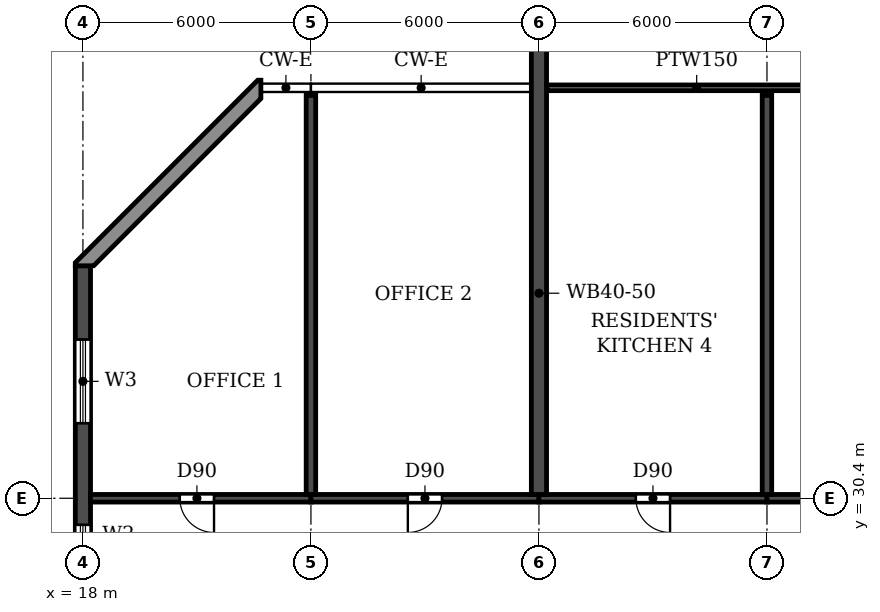
"""IFC4 building model, lengths in metres.
Left out: names, types, materials, properties, quantities, classifications, styles, units other than length and angle.
Written with IfcOpenShell. Run it as: python <this file> out.ifc"""

import sys

from ifc_helpers import new_model, si_unit, direction, frame, frame_2d, origin, place, context, subcontext, project, spatial, polyline, rectangle, outline, extrude, element, fill, save


model = new_model("IFC4")
c1 = context("Model", 3, precision=1e-05, world=origin(), true_north=direction((0.0, 1.0)))
c2 = subcontext(c1, "Body", "Model", "MODEL_VIEW")
j1 = project(units=[si_unit("LENGTHUNIT", "METRE"), si_unit("PLANEANGLEUNIT", "RADIAN")], contexts=[c1])
p1 = place(None, origin())
s1 = spatial("IfcSite", under=j1, at=p1, CompositionType="ELEMENT")
p2 = place(p1, origin())
s2 = spatial("IfcBuilding", under=s1, at=p2, CompositionType="ELEMENT")
p3 = place(p2, frame((0.0, 0.0, 261.0)))
s3 = spatial("IfcBuildingStorey", under=s2, at=p3, CompositionType="ELEMENT", Elevation=261.0)
for number, where, z_axis, x_axis in (
    (1, (24.0, 30.5, 0.0), (0.0, 0.0, 1.0), (0.0, 1.0, 0.0)),
    (2, (36.0, 30.5, 0.0), (0.0, 0.0, 1.0), (0.0, 1.0, 0.0)),
):
    element("IfcWall", number, at=place(p3, frame(where, z_axis=z_axis, x_axis=x_axis)), inside=s3, PredefinedType="SHEAR", context=c2, shape_type="SweptSolid", body=[
        extrude(rectangle(XDim=10.5, YDim=0.25, at=frame_2d((5.25, 0.0))), origin(), (0.0, 0.0, 1.0), 5.7),
    ])
p4 = place(p3, frame((18.0, 4.683, 0.0), z_axis=(0.0, 0.0, 1.0), x_axis=(0.0, 1.0, 0.0)))
e3 = element("IfcWall", 3, at=p4, inside=s3, PredefinedType="SHEAR", context=c2, shape_type="SweptSolid", body=[
    extrude(rectangle(XDim=31.834, YDim=0.4, at=frame_2d((15.917, 0.0))), origin(), (0.0, 0.0, 1.0), 5.7),
])
p5 = place(p4, frame((23.817, 0.0, 0.9)))
e4 = element("IfcOpeningElement", 4, at=p5, cuts=e3, PredefinedType="OPENING", context=c2, shape_type="SweptSolid", body=[
    extrude(rectangle(XDim=1.2, YDim=1.5, at=frame_2d((0.6, 0.75))), frame((0.0, 0.21, 0.0), z_axis=(0.0, -1.0, 0.0), x_axis=(1.0, 0.0, 0.0)), (0.0, 0.0, 1.0), 0.42),
])
p6 = place(p4, frame((8.017, 0.0, 0.9)))
e5 = element("IfcOpeningElement", 5, at=p6, cuts=e3, PredefinedType="OPENING", context=c2, shape_type="SweptSolid", body=[
    extrude(rectangle(XDim=1.2, YDim=1.5, at=frame_2d((0.6, 0.75))), frame((0.0, 0.21, 0.0), z_axis=(0.0, -1.0, 0.0), x_axis=(1.0, 0.0, 0.0)), (0.0, 0.0, 1.0), 0.42),
])
p7 = place(p4, frame((27.694, 0.0, 0.6)))
e6 = element("IfcOpeningElement", 6, at=p7, cuts=e3, PredefinedType="OPENING", context=c2, shape_type="SweptSolid", body=[
    extrude(rectangle(XDim=2.2, YDim=1.8, at=frame_2d((1.1, 0.9))), frame((0.0, 0.21, 0.0), z_axis=(0.0, -1.0, 0.0), x_axis=(1.0, 0.0, 0.0)), (0.0, 0.0, 1.0), 0.42),
])
p8 = place(p4, frame((2.541, 0.0, 0.6)))
e7 = element("IfcOpeningElement", 7, at=p8, cuts=e3, PredefinedType="OPENING", context=c2, shape_type="SweptSolid", body=[
    extrude(rectangle(XDim=2.2, YDim=1.8, at=frame_2d((1.1, 0.9))), frame((0.0, 0.21, 0.0), z_axis=(0.0, -1.0, 0.0), x_axis=(1.0, 0.0, 0.0)), (0.0, 0.0, 1.0), 0.42),
])
p9 = place(p4, frame((15.917, 0.0, 0.9)))
e8 = element("IfcOpeningElement", 8, at=p9, cuts=e3, PredefinedType="OPENING", context=c2, shape_type="SweptSolid", body=[
    extrude(rectangle(XDim=1.2, YDim=1.5, at=frame_2d((0.6, 0.75))), frame((0.0, 0.21, 0.0), z_axis=(0.0, -1.0, 0.0), x_axis=(1.0, 0.0, 0.0)), (0.0, 0.0, 1.0), 0.42),
])
p10 = place(p3, frame((18.2, 30.4, 0.0), z_axis=(0.0, 0.0, 1.0), x_axis=(1.0, 0.0, 0.0)))
e9 = element("IfcWall", 9, at=p10, inside=s3, PredefinedType="SHEAR", context=c2, shape_type="SweptSolid", body=[
    extrude(rectangle(XDim=5.8, YDim=0.2, at=frame_2d((2.9, 0.0))), origin(), (0.0, 0.0, 1.0), 5.1),
])
p11 = place(p10, frame((2.35, 0.0, 0.0)))
e10 = element("IfcOpeningElement", 10, at=p11, cuts=e9, PredefinedType="OPENING", context=c2, shape_type="SweptSolid", body=[
    extrude(rectangle(XDim=0.9, YDim=2.1, at=frame_2d((0.45, 1.05))), frame((0.0, 0.11, 0.0), z_axis=(0.0, -1.0, 0.0), x_axis=(1.0, 0.0, 0.0)), (0.0, 0.0, 1.0), 0.22),
])
p12 = place(p3, frame((24.0, 30.4, 0.0), z_axis=(0.0, 0.0, 1.0), x_axis=(1.0, 0.0, 0.0)))
e11 = element("IfcWall", 11, at=p12, inside=s3, PredefinedType="SHEAR", context=c2, shape_type="SweptSolid", body=[
    extrude(rectangle(XDim=6.0, YDim=0.2, at=frame_2d((3.0, 0.0))), origin(), (0.0, 0.0, 1.0), 5.1),
])
p13 = place(p12, frame((2.55, 0.0, 0.0)))
e12 = element("IfcOpeningElement", 12, at=p13, cuts=e11, PredefinedType="OPENING", context=c2, shape_type="SweptSolid", body=[
    extrude(rectangle(XDim=0.9, YDim=2.1, at=frame_2d((0.45, 1.05))), frame((0.0, 0.11, 0.0), z_axis=(0.0, -1.0, 0.0), x_axis=(1.0, 0.0, 0.0)), (0.0, 0.0, 1.0), 0.22),
])
p14 = place(p3, frame((30.0, 30.4, 0.0), z_axis=(0.0, 0.0, 1.0), x_axis=(1.0, 0.0, 0.0)))
e13 = element("IfcWall", 13, at=p14, inside=s3, PredefinedType="SHEAR", context=c2, shape_type="SweptSolid", body=[
    extrude(rectangle(XDim=6.0, YDim=0.2, at=frame_2d((3.0, 0.0))), origin(), (0.0, 0.0, 1.0), 5.1),
])
p15 = place(p14, frame((2.55, 0.0, 0.0)))
e14 = element("IfcOpeningElement", 14, at=p15, cuts=e13, PredefinedType="OPENING", context=c2, shape_type="SweptSolid", body=[
    extrude(rectangle(XDim=0.9, YDim=2.1, at=frame_2d((0.45, 1.05))), frame((0.0, 0.11, 0.0), z_axis=(0.0, -1.0, 0.0), x_axis=(1.0, 0.0, 0.0)), (0.0, 0.0, 1.0), 0.22),
])
p16 = place(p3, frame((36.0, 30.4, 0.0), z_axis=(0.0, 0.0, 1.0), x_axis=(1.0, 0.0, 0.0)))
e15 = element("IfcWall", 15, at=p16, inside=s3, PredefinedType="SHEAR", context=c2, shape_type="SweptSolid", body=[
    extrude(rectangle(XDim=6.0, YDim=0.2, at=frame_2d((3.0, 0.0))), origin(), (0.0, 0.0, 1.0), 5.1),
])
p17 = place(p16, frame((2.1, 0.0, 0.0)))
e16 = element("IfcOpeningElement", 16, at=p17, cuts=e15, PredefinedType="OPENING", context=c2, shape_type="SweptSolid", body=[
    extrude(rectangle(XDim=1.8, YDim=2.1, at=frame_2d((0.9, 1.05))), frame((0.0, 0.11, 0.0), z_axis=(0.0, -1.0, 0.0), x_axis=(1.0, 0.0, 0.0)), (0.0, 0.0, 1.0), 0.22),
])
p18 = place(p3, frame((30.0, 30.5, -1.2), z_axis=(0.0, 0.0, 1.0), x_axis=(0.0, 1.0, 0.0)))
e17 = element("IfcWall", 17, at=p18, inside=s3, PredefinedType="SHEAR", context=c2, shape_type="SweptSolid", body=[
    extrude(rectangle(XDim=21.1, YDim=0.4, at=frame_2d((10.55, 0.0))), origin(), (0.0, 0.0, 1.0), 6.9),
])
p19 = place(p3, origin())
e18 = element("IfcWall", 18, at=p19, inside=s3, PredefinedType="STANDARD", context=c2, shape_type="SweptSolid", body=[
    extrude(outline(polyline([(22.683, 41.4), (22.6, 41.4), (17.8, 36.6), (17.8, 36.517), (18.283, 36.517), (22.683, 40.917), (22.683, 41.4)])), origin(), (0.0, 0.0, 1.0), 5.7),
])
p20 = place(p3, frame((30.21, 41.2, 0.0), z_axis=(0.0, 0.0, 1.0), x_axis=(1.0, 0.0, 0.0)))
e19 = element("IfcWall", 19, at=p20, inside=s3, PredefinedType="PARTITIONING", context=c2, shape_type="SweptSolid", body=[
    extrude(rectangle(XDim=17.79, YDim=0.15, at=frame_2d((8.895, 0.0))), origin(), (0.0, 0.0, 1.0), 5.7),
])
p21 = place(p20, frame((7.89, 0.0, 0.0)))
e20 = element("IfcOpeningElement", 20, at=p21, cuts=e19, PredefinedType="OPENING", context=c2, shape_type="SweptSolid", body=[
    extrude(rectangle(XDim=1.8, YDim=2.1, at=frame_2d((0.9, 1.05))), frame((0.0, 0.085, 0.0), z_axis=(0.0, -1.0, 0.0), x_axis=(1.0, 0.0, 0.0)), (0.0, 0.0, 1.0), 0.17),
])
p22 = place(p20, frame((13.89, 0.0, 0.0)))
e21 = element("IfcOpeningElement", 21, at=p22, cuts=e19, PredefinedType="OPENING", context=c2, shape_type="SweptSolid", body=[
    extrude(rectangle(XDim=1.8, YDim=2.1, at=frame_2d((0.9, 1.05))), frame((0.0, 0.085, 0.0), z_axis=(0.0, -1.0, 0.0), x_axis=(1.0, 0.0, 0.0)), (0.0, 0.0, 1.0), 0.17),
])
p23 = place(p5, origin())
e22 = element("IfcWindow", 22, at=p23, inside=s3, PartitioningType="SINGLE_PANEL", PredefinedType="WINDOW", context=c2, shape_type="SweptSolid", body=[
    extrude(rectangle(XDim=1.2, YDim=1.5, at=frame_2d((0.6, 0.75))), frame((0.0, 0.03, 0.0), z_axis=(0.0, -1.0, 0.0), x_axis=(1.0, 0.0, 0.0)), (0.0, 0.0, 1.0), 0.06),
])
fill(e4, e22)
p24 = place(p7, origin())
e23 = element("IfcWindow", 23, at=p24, inside=s3, PartitioningType="DOUBLE_PANEL_HORIZONTAL", PredefinedType="WINDOW", context=c2, shape_type="SweptSolid", body=[
    extrude(rectangle(XDim=2.2, YDim=1.8, at=frame_2d((1.1, 0.9))), frame((0.0, 0.03, 0.0), z_axis=(0.0, -1.0, 0.0), x_axis=(1.0, 0.0, 0.0)), (0.0, 0.0, 1.0), 0.06),
])
fill(e6, e23)
p25 = place(p11, frame((0.9, 0.0, 0.0), z_axis=(0.0, 0.0, 1.0), x_axis=(-1.0, 0.0, 0.0)))
e24 = element("IfcDoor", 24, at=p25, inside=s3, OperationType="SINGLE_SWING_LEFT", PredefinedType="DOOR", context=c2, shape_type="SweptSolid", body=[
    extrude(rectangle(XDim=0.9, YDim=2.1, at=frame_2d((0.45, 1.05))), frame((0.0, 0.025, 0.0), z_axis=(0.0, -1.0, 0.0), x_axis=(1.0, 0.0, 0.0)), (0.0, 0.0, 1.0), 0.05),
])
fill(e10, e24)
p26 = place(p13, frame((0.9, 0.0, 0.0), z_axis=(0.0, 0.0, 1.0), x_axis=(-1.0, 0.0, 0.0)))
e25 = element("IfcDoor", 25, at=p26, inside=s3, OperationType="SINGLE_SWING_RIGHT", PredefinedType="DOOR", context=c2, shape_type="SweptSolid", body=[
    extrude(rectangle(XDim=0.9, YDim=2.1, at=frame_2d((0.45, 1.05))), frame((0.0, 0.025, 0.0), z_axis=(0.0, -1.0, 0.0), x_axis=(1.0, 0.0, 0.0)), (0.0, 0.0, 1.0), 0.05),
])
fill(e12, e25)
p27 = place(p15, frame((0.9, 0.0, 0.0), z_axis=(0.0, 0.0, 1.0), x_axis=(-1.0, 0.0, 0.0)))
e26 = element("IfcDoor", 26, at=p27, inside=s3, OperationType="SINGLE_SWING_LEFT", PredefinedType="DOOR", context=c2, shape_type="SweptSolid", body=[
    extrude(rectangle(XDim=0.9, YDim=2.1, at=frame_2d((0.45, 1.05))), frame((0.0, 0.025, 0.0), z_axis=(0.0, -1.0, 0.0), x_axis=(1.0, 0.0, 0.0)), (0.0, 0.0, 1.0), 0.05),
])
fill(e14, e26)
save(model, sys.argv[1])
